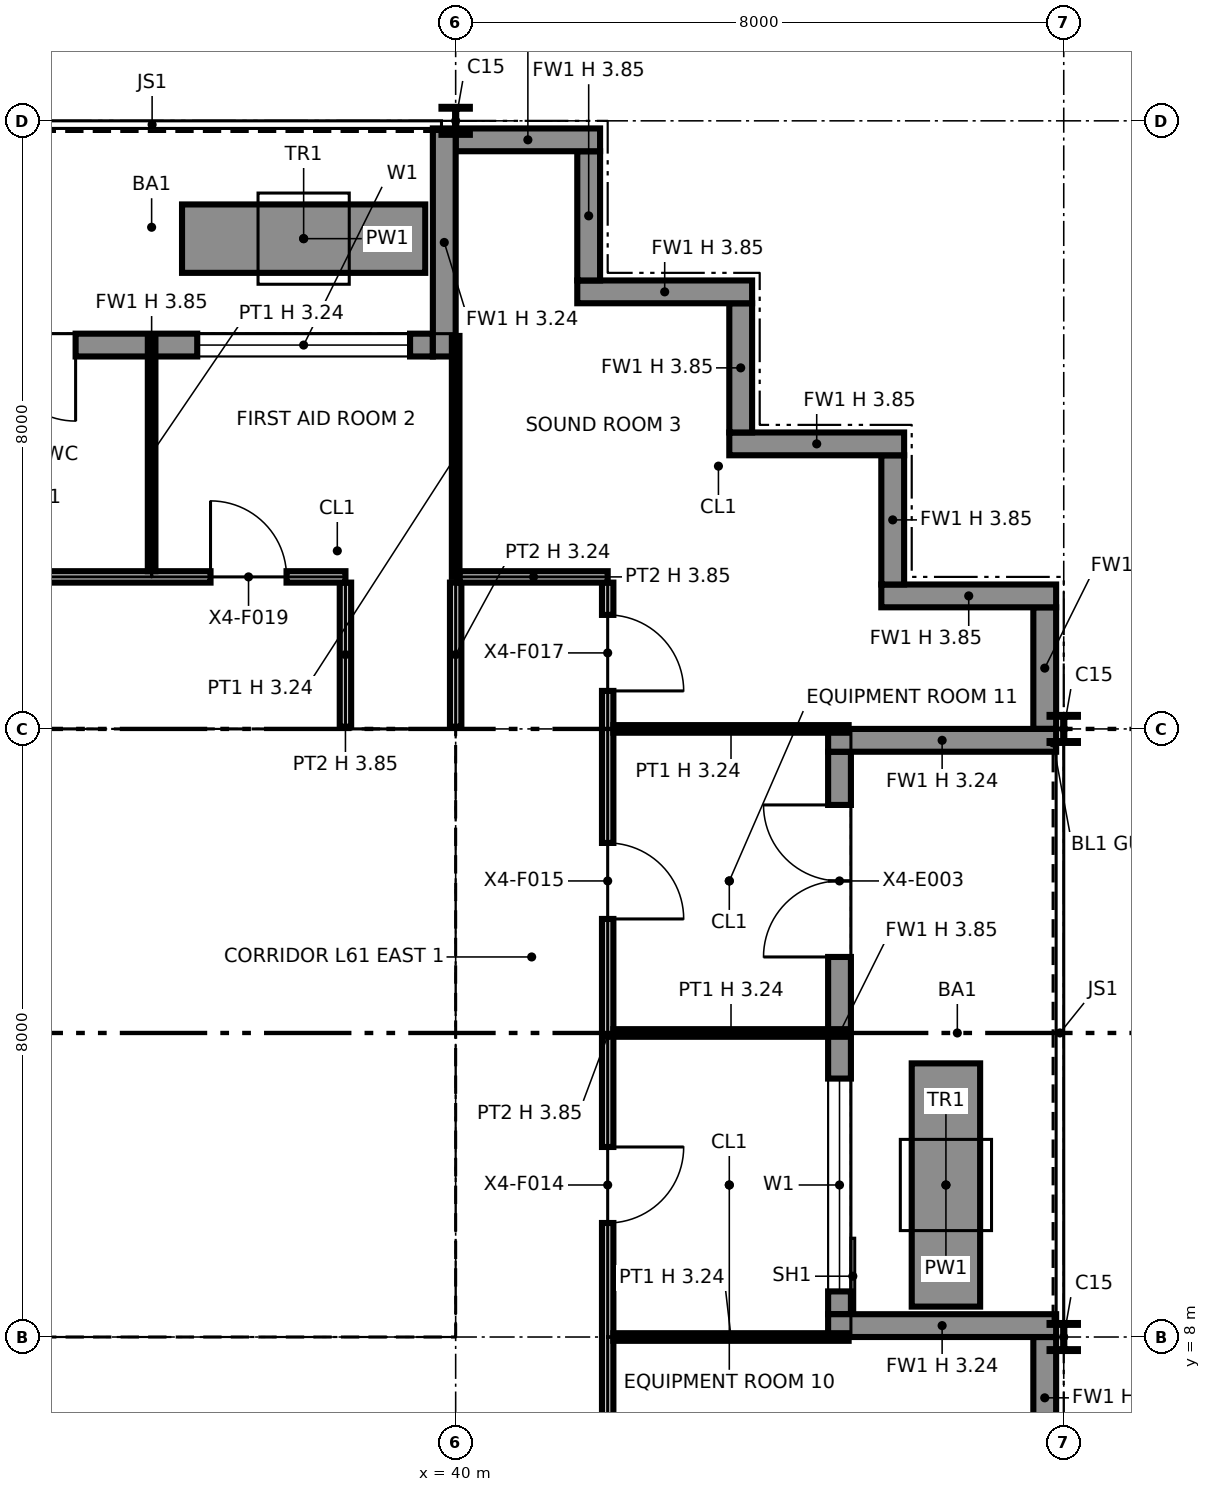
"""IFC4 building model, lengths in metres.
Left out: names, types, materials, properties, quantities, classifications, styles, units other than length and angle.
Written with IfcOpenShell. Run it as: python <this file> out.ifc"""

import sys

from ifc_helpers import new_model, si_unit, direction, frame, frame_2d, origin, origin_2d, place, context, subcontext, project, spatial, polyline, rectangle, i_section, outline, extrude, element, fill, save


model = new_model("IFC4")
c1 = context("Model", 3, precision=1e-05, world=origin(), true_north=direction((0.0, 1.0)))
c2 = subcontext(c1, "Body", "Model", "MODEL_VIEW")
j1 = project(units=[si_unit("LENGTHUNIT", "METRE"), si_unit("PLANEANGLEUNIT", "RADIAN")], contexts=[c1])
p1 = place(None, origin())
s1 = spatial("IfcSite", under=j1, at=p1, CompositionType="ELEMENT")
p2 = place(p1, origin())
s2 = spatial("IfcBuilding", under=s1, at=p2, CompositionType="ELEMENT")
p3 = place(p2, frame((0.0, 0.0, 279.0)))
s3 = spatial("IfcBuildingStorey", under=s2, at=p3, CompositionType="ELEMENT", Elevation=279.0)
for number, where, z_axis, x_axis in (
    (1, (40.0, 8.0, 0.0), (0.0, 0.0, 1.0), (1.0, 0.0, 0.0)),
    (2, (40.0, 16.0, 0.0), (0.0, 0.0, 1.0), (1.0, 0.0, 0.0)),
):
    element("IfcColumn", number, at=place(p3, frame(where, z_axis=z_axis, x_axis=x_axis)), inside=s3, PredefinedType="COLUMN", context=c2, shape_type="SweptSolid", body=[
        extrude(i_section(OverallWidth=0.257, OverallDepth=0.363, WebThickness=0.013, FlangeThickness=0.022, at=origin_2d()), origin(), (0.0, 0.0, 1.0), 3.85),
    ])
for number, where, z_axis, x_axis in (
    (3, (40.0, 24.0, 0.0), (0.0, 0.0, 1.0), (1.0, 0.0, 0.0)),
    (4, (48.0, 8.0, 0.0), (0.0, 0.0, 1.0), (1.0, 0.0, 0.0)),
    (5, (48.0, 16.0, 0.0), (0.0, 0.0, 1.0), (1.0, 0.0, 0.0)),
):
    element("IfcColumn", number, at=place(p3, frame(where, z_axis=z_axis, x_axis=x_axis)), inside=s3, PredefinedType="COLUMN", context=c2, shape_type="SweptSolid", body=[
        extrude(i_section(OverallWidth=0.373, OverallDepth=0.368, WebThickness=0.015, FlangeThickness=0.024, at=origin_2d()), origin(), (0.0, 0.0, 1.0), 3.85),
    ])
p4 = place(p3, frame((47.75, 6.4, 0.0), z_axis=(0.0, 0.0, 1.0), x_axis=(0.0, 1.0, 0.0)))
e6 = element("IfcWall", 6, at=p4, inside=s3, PredefinedType="SOLIDWALL", context=c2, shape_type="SweptSolid", body=[
    extrude(rectangle(XDim=1.6, YDim=0.3, at=frame_2d((0.8, 0.0))), origin(), (0.0, 0.0, 1.0), 3.85),
])
p5 = place(p3, frame((45.05, 8.3, 0.0), z_axis=(0.0, 0.0, 1.0), x_axis=(0.0, 1.0, 0.0)))
e7 = element("IfcWall", 7, at=p5, inside=s3, PredefinedType="SOLIDWALL", context=c2, shape_type="SweptSolid", body=[
    extrude(rectangle(XDim=7.4, YDim=0.3, at=frame_2d((3.7, 0.0))), origin(), (0.0, 0.0, 1.0), 3.85),
])
p6 = place(p5, frame((0.3, 0.0, 0.9)))
e8 = element("IfcOpeningElement", 8, at=p6, cuts=e7, PredefinedType="OPENING", context=c2, shape_type="SweptSolid", body=[
    extrude(rectangle(XDim=2.8, YDim=2.2, at=frame_2d((1.4, 1.1))), frame((0.0, 0.16, 0.0), z_axis=(0.0, -1.0, 0.0), x_axis=(1.0, 0.0, 0.0)), (0.0, 0.0, 1.0), 0.32),
])
p7 = place(p5, frame((4.7, 0.0, 0.0)))
e9 = element("IfcOpeningElement", 9, at=p7, cuts=e7, PredefinedType="OPENING", context=c2, shape_type="SweptSolid", body=[
    extrude(rectangle(XDim=2.0, YDim=2.4, at=frame_2d((1.0, 1.2))), frame((0.0, 0.16, 0.0), z_axis=(0.0, -1.0, 0.0), x_axis=(1.0, 0.0, 0.0)), (0.0, 0.0, 1.0), 0.32),
])
for number, where, z_axis, x_axis in (
    (10, (47.9, 8.15, 0.0), (0.0, 0.0, 1.0), (-1.0, 0.0, 0.0)),
    (11, (47.9, 15.85, 0.0), (0.0, 0.0, 1.0), (-1.0, 0.0, 0.0)),
):
    element("IfcWall", number, at=place(p3, frame(where, z_axis=z_axis, x_axis=x_axis)), inside=s3, PredefinedType="SOLIDWALL", context=c2, shape_type="SweptSolid", body=[
        extrude(rectangle(XDim=3.0, YDim=0.3, at=frame_2d((1.5, 0.0))), origin(), (0.0, 0.0, 1.0), 3.237),
    ])
p8 = place(p3, frame((47.75, 16.0, 0.0), z_axis=(0.0, 0.0, 1.0), x_axis=(0.0, 1.0, 0.0)))
e12 = element("IfcWall", 12, at=p8, inside=s3, PredefinedType="SOLIDWALL", context=c2, shape_type="SweptSolid", body=[
    extrude(rectangle(XDim=1.6, YDim=0.3, at=frame_2d((0.8, 0.0))), origin(), (0.0, 0.0, 1.0), 3.85),
])
p9 = place(p3, frame((46.45, 8.4, 0.0), z_axis=(0.0, 0.0, 1.0), x_axis=(0.0, 1.0, 0.0)))
e13 = element("IfcWall", 13, at=p9, inside=s3, PredefinedType="SOLIDWALL", context=c2, shape_type="SweptSolid", body=[
    extrude(rectangle(XDim=3.2, YDim=0.9, at=frame_2d((1.6, 0.0))), origin(), (0.0, 0.0, 1.0), 0.6),
])
p10 = place(p3, frame((47.9, 17.75, 0.0), z_axis=(0.0, 0.0, 1.0), x_axis=(-1.0, 0.0, 0.0)))
e14 = element("IfcWall", 14, at=p10, inside=s3, PredefinedType="SOLIDWALL", context=c2, shape_type="SweptSolid", body=[
    extrude(rectangle(XDim=2.3, YDim=0.3, at=frame_2d((1.15, 0.0))), origin(), (0.0, 0.0, 1.0), 3.85),
])
p11 = place(p3, frame((45.75, 17.9, 0.0), z_axis=(0.0, 0.0, 1.0), x_axis=(0.0, 1.0, 0.0)))
e15 = element("IfcWall", 15, at=p11, inside=s3, PredefinedType="SOLIDWALL", context=c2, shape_type="SweptSolid", body=[
    extrude(rectangle(XDim=1.7, YDim=0.3, at=frame_2d((0.85, 0.0))), origin(), (0.0, 0.0, 1.0), 3.85),
])
p12 = place(p3, frame((45.9, 19.75, 0.0), z_axis=(0.0, 0.0, 1.0), x_axis=(-1.0, 0.0, 0.0)))
e16 = element("IfcWall", 16, at=p12, inside=s3, PredefinedType="SOLIDWALL", context=c2, shape_type="SweptSolid", body=[
    extrude(rectangle(XDim=2.3, YDim=0.3, at=frame_2d((1.15, 0.0))), origin(), (0.0, 0.0, 1.0), 3.85),
])
p13 = place(p3, frame((43.75, 19.9, 0.0), z_axis=(0.0, 0.0, 1.0), x_axis=(0.0, 1.0, 0.0)))
e17 = element("IfcWall", 17, at=p13, inside=s3, PredefinedType="SOLIDWALL", context=c2, shape_type="SweptSolid", body=[
    extrude(rectangle(XDim=1.7, YDim=0.3, at=frame_2d((0.85, 0.0))), origin(), (0.0, 0.0, 1.0), 3.85),
])
p14 = place(p3, frame((43.9, 21.75, 0.0), z_axis=(0.0, 0.0, 1.0), x_axis=(-1.0, 0.0, 0.0)))
e18 = element("IfcWall", 18, at=p14, inside=s3, PredefinedType="SOLIDWALL", context=c2, shape_type="SweptSolid", body=[
    extrude(rectangle(XDim=2.3, YDim=0.3, at=frame_2d((1.15, 0.0))), origin(), (0.0, 0.0, 1.0), 3.85),
])
p15 = place(p3, frame((41.75, 21.9, 0.0), z_axis=(0.0, 0.0, 1.0), x_axis=(0.0, 1.0, 0.0)))
e19 = element("IfcWall", 19, at=p15, inside=s3, PredefinedType="SOLIDWALL", context=c2, shape_type="SweptSolid", body=[
    extrude(rectangle(XDim=1.7, YDim=0.3, at=frame_2d((0.85, 0.0))), origin(), (0.0, 0.0, 1.0), 3.85),
])
p16 = place(p3, frame((41.9, 23.75, 0.0), z_axis=(0.0, 0.0, 1.0), x_axis=(-1.0, 0.0, 0.0)))
e20 = element("IfcWall", 20, at=p16, inside=s3, PredefinedType="SOLIDWALL", context=c2, shape_type="SweptSolid", body=[
    extrude(rectangle(XDim=1.9, YDim=0.3, at=frame_2d((0.95, 0.0))), origin(), (0.0, 0.0, 1.0), 3.85),
])
p17 = place(p3, frame((39.7, 21.05, 0.0), z_axis=(0.0, 0.0, 1.0), x_axis=(-1.0, 0.0, 0.0)))
e21 = element("IfcWall", 21, at=p17, inside=s3, PredefinedType="SOLIDWALL", context=c2, shape_type="SweptSolid", body=[
    extrude(rectangle(XDim=7.4, YDim=0.3, at=frame_2d((3.7, 0.0))), origin(), (0.0, 0.0, 1.0), 3.85),
])
p18 = place(p17, frame((0.3, 0.0, 0.9)))
e22 = element("IfcOpeningElement", 22, at=p18, cuts=e21, PredefinedType="OPENING", context=c2, shape_type="SweptSolid", body=[
    extrude(rectangle(XDim=2.8, YDim=2.2, at=frame_2d((1.4, 1.1))), frame((0.0, 0.16, 0.0), z_axis=(0.0, -1.0, 0.0), x_axis=(1.0, 0.0, 0.0)), (0.0, 0.0, 1.0), 0.32),
])
p19 = place(p17, frame((4.7, 0.0, 0.0)))
e23 = element("IfcOpeningElement", 23, at=p19, cuts=e21, PredefinedType="OPENING", context=c2, shape_type="SweptSolid", body=[
    extrude(rectangle(XDim=2.0, YDim=2.4, at=frame_2d((1.0, 1.2))), frame((0.0, 0.16, 0.0), z_axis=(0.0, -1.0, 0.0), x_axis=(1.0, 0.0, 0.0)), (0.0, 0.0, 1.0), 0.32),
])
p20 = place(p3, frame((39.85, 23.9, 0.0), z_axis=(0.0, 0.0, 1.0), x_axis=(0.0, -1.0, 0.0)))
e24 = element("IfcWall", 24, at=p20, inside=s3, PredefinedType="SOLIDWALL", context=c2, shape_type="SweptSolid", body=[
    extrude(rectangle(XDim=3.0, YDim=0.3, at=frame_2d((1.5, 0.0))), origin(), (0.0, 0.0, 1.0), 3.237),
])
p21 = place(p3, frame((39.6, 22.45, 0.0), z_axis=(0.0, 0.0, 1.0), x_axis=(-1.0, 0.0, 0.0)))
e25 = element("IfcWall", 25, at=p21, inside=s3, PredefinedType="SOLIDWALL", context=c2, shape_type="SweptSolid", body=[
    extrude(rectangle(XDim=3.2, YDim=0.9, at=frame_2d((1.6, 0.0))), origin(), (0.0, 0.0, 1.0), 0.6),
])
p22 = place(p3, frame((24.65, 8.75, 0.0), z_axis=(0.0, 0.0, 1.0), x_axis=(1.0, 0.0, 0.0)))
e26 = element("IfcWall", 26, at=p22, inside=s3, PredefinedType="PARTITIONING", context=c2, shape_type="SweptSolid", body=[
    extrude(outline(polyline([(0.0, 0.0), (14.7, 0.0), (14.7, 3.85), (7.438, 3.85), (7.437, 3.318), (7.263, 3.318), (7.262, 3.85), (0.0, 3.85), (0.0, 0.0)])), frame((0.0, 0.1, 0.0), z_axis=(0.0, -1.0, 0.0), x_axis=(1.0, 0.0, 0.0)), (0.0, 0.0, 1.0), 0.2),
])
p23 = place(p3, frame((24.65, 15.25, 0.0), z_axis=(0.0, 0.0, 1.0), x_axis=(1.0, 0.0, 0.0)))
e27 = element("IfcWall", 27, at=p23, inside=s3, PredefinedType="PARTITIONING", context=c2, shape_type="SweptSolid", body=[
    extrude(outline(polyline([(0.0, 0.0), (14.7, 0.0), (14.7, 3.85), (7.438, 3.85), (7.437, 3.318), (7.263, 3.318), (7.262, 3.85), (0.0, 3.85), (0.0, 0.0)])), frame((0.0, 0.1, 0.0), z_axis=(0.0, -1.0, 0.0), x_axis=(1.0, 0.0, 0.0)), (0.0, 0.0, 1.0), 0.2),
])
p24 = place(p23, frame((2.85, 0.0, 0.0)))
e28 = element("IfcOpeningElement", 28, at=p24, cuts=e27, PredefinedType="OPENING", context=c2, shape_type="SweptSolid", body=[
    extrude(rectangle(XDim=1.8, YDim=2.1, at=frame_2d((0.9, 1.05))), frame((0.0, 0.11, 0.0), z_axis=(0.0, -1.0, 0.0), x_axis=(1.0, 0.0, 0.0)), (0.0, 0.0, 1.0), 0.22),
])
p25 = place(p23, frame((9.95, 0.0, 0.0), z_axis=(0.0, 0.0, 1.0), x_axis=(-1.0, 0.0, 0.0)))
e29 = element("IfcOpeningElement", 29, at=p25, cuts=e27, PredefinedType="OPENING", context=c2, shape_type="SweptSolid", body=[
    extrude(rectangle(XDim=1.4, YDim=2.1, at=frame_2d((0.7, 1.05))), frame((0.0, 0.11, 0.0), z_axis=(0.0, -1.0, 0.0), x_axis=(1.0, 0.0, 0.0)), (0.0, 0.0, 1.0), 0.22),
])
p26 = place(p23, frame((13.4, 0.0, 0.0), z_axis=(0.0, 0.0, 1.0), x_axis=(-1.0, 0.0, 0.0)))
e30 = element("IfcOpeningElement", 30, at=p26, cuts=e27, PredefinedType="OPENING", context=c2, shape_type="SweptSolid", body=[
    extrude(rectangle(XDim=1.4, YDim=2.1, at=frame_2d((0.7, 1.05))), frame((0.0, 0.11, 0.0), z_axis=(0.0, -1.0, 0.0), x_axis=(1.0, 0.0, 0.0)), (0.0, 0.0, 1.0), 0.22),
])
for number, where, z_axis, x_axis in (
    (31, (35.6, 8.85, 0.0), (0.0, 0.0, 1.0), (0.0, 1.0, 0.0)),
    (32, (39.25, 8.85, 0.0), (0.0, 0.0, 1.0), (0.0, 1.0, 0.0)),
):
    element("IfcWall", number, at=place(p3, frame(where, z_axis=z_axis, x_axis=x_axis)), inside=s3, PredefinedType="PARTITIONING", context=c2, shape_type="SweptSolid", body=[
        extrude(rectangle(XDim=6.3, YDim=0.2, at=frame_2d((3.15, 0.0))), origin(), (0.0, 0.0, 1.0), 3.85),
    ])
p27 = place(p3, frame((42.0, 6.0, 0.0), z_axis=(0.0, 0.0, 1.0), x_axis=(0.0, 1.0, 0.0)))
e33 = element("IfcWall", 33, at=p27, inside=s3, PredefinedType="PARTITIONING", context=c2, shape_type="SweptSolid", body=[
    extrude(outline(polyline([(0.0, 0.0), (11.925, 0.0), (11.925, 3.85), (10.3, 3.85), (10.298, 3.238), (9.702, 3.238), (9.7, 3.85), (6.3, 3.85), (6.298, 3.238), (5.702, 3.238), (5.7, 3.85), (2.3, 3.85), (2.298, 3.238), (1.702, 3.238), (1.7, 3.85), (0.0, 3.85), (0.0, 0.0)])), frame((0.0, 0.075, 0.0), z_axis=(0.0, -1.0, 0.0), x_axis=(1.0, 0.0, 0.0)), (0.0, 0.0, 1.0), 0.15),
])
p28 = place(p27, frame((4.5, 0.0, 0.0), z_axis=(0.0, 0.0, 1.0), x_axis=(-1.0, 0.0, 0.0)))
e34 = element("IfcOpeningElement", 34, at=p28, cuts=e33, PredefinedType="OPENING", context=c2, shape_type="SweptSolid", body=[
    extrude(rectangle(XDim=1.0, YDim=2.1, at=frame_2d((0.5, 1.05))), frame((0.0, 0.085, 0.0), z_axis=(0.0, -1.0, 0.0), x_axis=(1.0, 0.0, 0.0)), (0.0, 0.0, 1.0), 0.17),
])
p29 = place(p27, frame((8.5, 0.0, 0.0), z_axis=(0.0, 0.0, 1.0), x_axis=(-1.0, 0.0, 0.0)))
e35 = element("IfcOpeningElement", 35, at=p29, cuts=e33, PredefinedType="OPENING", context=c2, shape_type="SweptSolid", body=[
    extrude(rectangle(XDim=1.0, YDim=2.1, at=frame_2d((0.5, 1.05))), frame((0.0, 0.085, 0.0), z_axis=(0.0, -1.0, 0.0), x_axis=(1.0, 0.0, 0.0)), (0.0, 0.0, 1.0), 0.17),
])
p30 = place(p27, frame((11.5, 0.0, 0.0), z_axis=(0.0, 0.0, 1.0), x_axis=(-1.0, 0.0, 0.0)))
e36 = element("IfcOpeningElement", 36, at=p30, cuts=e33, PredefinedType="OPENING", context=c2, shape_type="SweptSolid", body=[
    extrude(rectangle(XDim=1.0, YDim=2.1, at=frame_2d((0.5, 1.05))), frame((0.0, 0.085, 0.0), z_axis=(0.0, -1.0, 0.0), x_axis=(1.0, 0.0, 0.0)), (0.0, 0.0, 1.0), 0.17),
])
for number, where, z_axis, x_axis in (
    (37, (42.075, 8.0, 0.0), (0.0, 0.0, 1.0), (1.0, 0.0, 0.0)),
    (38, (42.075, 12.0, 0.0), (0.0, 0.0, 1.0), (1.0, 0.0, 0.0)),
    (39, (42.075, 16.0, 0.0), (0.0, 0.0, 1.0), (1.0, 0.0, 0.0)),
):
    element("IfcWall", number, at=place(p3, frame(where, z_axis=z_axis, x_axis=x_axis)), inside=s3, PredefinedType="PARTITIONING", context=c2, shape_type="SweptSolid", body=[
        extrude(rectangle(XDim=3.095, YDim=0.1, at=frame_2d((1.547, 0.0))), origin(), (0.0, 0.0, 1.0), 3.238),
    ])
p31 = place(p3, frame((38.55, 16.03, 0.0), z_axis=(0.0, 0.0, 1.0), x_axis=(0.0, 1.0, 0.0)))
e40 = element("IfcWall", 40, at=p31, inside=s3, PredefinedType="PARTITIONING", context=c2, shape_type="SweptSolid", body=[
    extrude(rectangle(XDim=1.895, YDim=0.15, at=frame_2d((0.948, 0.0))), origin(), (0.0, 0.0, 1.0), 3.85),
])
p32 = place(p3, frame((40.0, 16.03, 0.0), z_axis=(0.0, 0.0, 1.0), x_axis=(0.0, 1.0, 0.0)))
e41 = element("IfcWall", 41, at=p32, inside=s3, PredefinedType="PARTITIONING", context=c2, shape_type="SweptSolid", body=[
    extrude(rectangle(XDim=1.895, YDim=0.15, at=frame_2d((0.948, 0.0))), origin(), (0.0, 0.0, 1.0), 3.238),
])
p33 = place(p3, frame((26.075, 18.0, 0.0), z_axis=(0.0, 0.0, 1.0), x_axis=(1.0, 0.0, 0.0)))
e42 = element("IfcWall", 42, at=p33, inside=s3, PredefinedType="PARTITIONING", context=c2, shape_type="SweptSolid", body=[
    extrude(rectangle(XDim=12.475, YDim=0.15, at=frame_2d((6.238, 0.0))), origin(), (0.0, 0.0, 1.0), 3.85),
])
p34 = place(p33, frame((7.425, 0.0, 0.0)))
e43 = element("IfcOpeningElement", 43, at=p34, cuts=e42, PredefinedType="OPENING", context=c2, shape_type="SweptSolid", body=[
    extrude(rectangle(XDim=1.0, YDim=2.1, at=frame_2d((0.5, 1.05))), frame((0.0, 0.085, 0.0), z_axis=(0.0, -1.0, 0.0), x_axis=(1.0, 0.0, 0.0)), (0.0, 0.0, 1.0), 0.17),
])
p35 = place(p33, frame((10.7, 0.0, 0.0)))
e44 = element("IfcOpeningElement", 44, at=p35, cuts=e42, PredefinedType="OPENING", context=c2, shape_type="SweptSolid", body=[
    extrude(rectangle(XDim=1.0, YDim=2.1, at=frame_2d((0.5, 1.05))), frame((0.0, 0.085, 0.0), z_axis=(0.0, -1.0, 0.0), x_axis=(1.0, 0.0, 0.0)), (0.0, 0.0, 1.0), 0.17),
])
p36 = place(p33, frame((3.425, 0.0, 0.0)))
e45 = element("IfcOpeningElement", 45, at=p36, cuts=e42, PredefinedType="OPENING", context=c2, shape_type="SweptSolid", body=[
    extrude(rectangle(XDim=1.0, YDim=2.1, at=frame_2d((0.5, 1.05))), frame((0.0, 0.085, 0.0), z_axis=(0.0, -1.0, 0.0), x_axis=(1.0, 0.0, 0.0)), (0.0, 0.0, 1.0), 0.17),
])
p37 = place(p3, frame((36.0, 18.075, 0.0), z_axis=(0.0, 0.0, 1.0), x_axis=(0.0, 1.0, 0.0)))
e46 = element("IfcWall", 46, at=p37, inside=s3, PredefinedType="PARTITIONING", context=c2, shape_type="SweptSolid", body=[
    extrude(rectangle(XDim=3.095, YDim=0.1, at=frame_2d((1.547, 0.0))), origin(), (0.0, 0.0, 1.0), 3.238),
])
p38 = place(p3, frame((40.05, 18.0, 0.0), z_axis=(0.0, 0.0, 1.0), x_axis=(1.0, 0.0, 0.0)))
e47 = element("IfcWall", 47, at=p38, inside=s3, PredefinedType="PARTITIONING", context=c2, shape_type="SweptSolid", body=[
    extrude(rectangle(XDim=1.95, YDim=0.15, at=frame_2d((0.975, 0.0))), origin(), (0.0, 0.0, 1.0), 3.85),
])
p39 = place(p3, frame((40.0, 18.0, 0.0), z_axis=(0.0, 0.0, 1.0), x_axis=(0.0, 1.0, 0.0)))
e48 = element("IfcWall", 48, at=p39, inside=s3, PredefinedType="PARTITIONING", context=c2, shape_type="SweptSolid", body=[
    extrude(rectangle(XDim=3.17, YDim=0.1, at=frame_2d((1.585, 0.0))), origin(), (0.0, 0.0, 1.0), 3.238),
])
p40 = place(p6, origin())
e49 = element("IfcWindow", 49, at=p40, inside=s3, PartitioningType="SINGLE_PANEL", PredefinedType="WINDOW", context=c2, shape_type="SweptSolid", body=[
    extrude(rectangle(XDim=2.8, YDim=2.2, at=frame_2d((1.4, 1.1))), frame((0.0, 0.03, 0.0), z_axis=(0.0, -1.0, 0.0), x_axis=(1.0, 0.0, 0.0)), (0.0, 0.0, 1.0), 0.06),
])
fill(e8, e49)
p41 = place(p7, origin())
e50 = element("IfcDoor", 50, at=p41, inside=s3, OperationType="DOUBLE_DOOR_SINGLE_SWING", PredefinedType="DOOR", context=c2, shape_type="SweptSolid", body=[
    extrude(rectangle(XDim=2.0, YDim=2.4, at=frame_2d((1.0, 1.2))), frame((0.0, 0.025, 0.0), z_axis=(0.0, -1.0, 0.0), x_axis=(1.0, 0.0, 0.0)), (0.0, 0.0, 1.0), 0.05),
])
fill(e9, e50)
p42 = place(p18, origin())
e51 = element("IfcWindow", 51, at=p42, inside=s3, PartitioningType="SINGLE_PANEL", PredefinedType="WINDOW", context=c2, shape_type="SweptSolid", body=[
    extrude(rectangle(XDim=2.8, YDim=2.2, at=frame_2d((1.4, 1.1))), frame((0.0, 0.03, 0.0), z_axis=(0.0, -1.0, 0.0), x_axis=(1.0, 0.0, 0.0)), (0.0, 0.0, 1.0), 0.06),
])
fill(e22, e51)
p43 = place(p19, origin())
e52 = element("IfcDoor", 52, at=p43, inside=s3, OperationType="DOUBLE_DOOR_SINGLE_SWING", PredefinedType="DOOR", context=c2, shape_type="SweptSolid", body=[
    extrude(rectangle(XDim=2.0, YDim=2.4, at=frame_2d((1.0, 1.2))), frame((0.0, 0.025, 0.0), z_axis=(0.0, -1.0, 0.0), x_axis=(1.0, 0.0, 0.0)), (0.0, 0.0, 1.0), 0.05),
])
fill(e23, e52)
p44 = place(p26, origin())
e53 = element("IfcDoor", 53, at=p44, inside=s3, OperationType="DOUBLE_DOOR_SINGLE_SWING", PredefinedType="NOTDEFINED", context=c2, shape_type="SweptSolid", body=[
    extrude(rectangle(XDim=1.4, YDim=2.1, at=frame_2d((0.7, 1.05))), frame((0.0, 0.025, 0.0), z_axis=(0.0, -1.0, 0.0), x_axis=(1.0, 0.0, 0.0)), (0.0, 0.0, 1.0), 0.05),
])
fill(e30, e53)
p45 = place(p28, origin())
e54 = element("IfcDoor", 54, at=p45, inside=s3, OperationType="SINGLE_SWING_LEFT", PredefinedType="DOOR", context=c2, shape_type="SweptSolid", body=[
    extrude(rectangle(XDim=1.0, YDim=2.1, at=frame_2d((0.5, 1.05))), frame((0.0, 0.025, 0.0), z_axis=(0.0, -1.0, 0.0), x_axis=(1.0, 0.0, 0.0)), (0.0, 0.0, 1.0), 0.05),
])
fill(e34, e54)
p46 = place(p29, origin())
e55 = element("IfcDoor", 55, at=p46, inside=s3, OperationType="SINGLE_SWING_RIGHT", PredefinedType="DOOR", context=c2, shape_type="SweptSolid", body=[
    extrude(rectangle(XDim=1.0, YDim=2.1, at=frame_2d((0.5, 1.05))), frame((0.0, 0.025, 0.0), z_axis=(0.0, -1.0, 0.0), x_axis=(1.0, 0.0, 0.0)), (0.0, 0.0, 1.0), 0.05),
])
fill(e35, e55)
p47 = place(p30, origin())
e56 = element("IfcDoor", 56, at=p47, inside=s3, OperationType="SINGLE_SWING_RIGHT", PredefinedType="DOOR", context=c2, shape_type="SweptSolid", body=[
    extrude(rectangle(XDim=1.0, YDim=2.1, at=frame_2d((0.5, 1.05))), frame((0.0, 0.025, 0.0), z_axis=(0.0, -1.0, 0.0), x_axis=(1.0, 0.0, 0.0)), (0.0, 0.0, 1.0), 0.05),
])
fill(e36, e56)
p48 = place(p35, origin())
e57 = element("IfcDoor", 57, at=p48, inside=s3, OperationType="SINGLE_SWING_LEFT", PredefinedType="DOOR", context=c2, shape_type="SweptSolid", body=[
    extrude(rectangle(XDim=1.0, YDim=2.1, at=frame_2d((0.5, 1.05))), frame((0.0, 0.025, 0.0), z_axis=(0.0, -1.0, 0.0), x_axis=(1.0, 0.0, 0.0)), (0.0, 0.0, 1.0), 0.05),
])
fill(e44, e57)
save(model, sys.argv[1])
